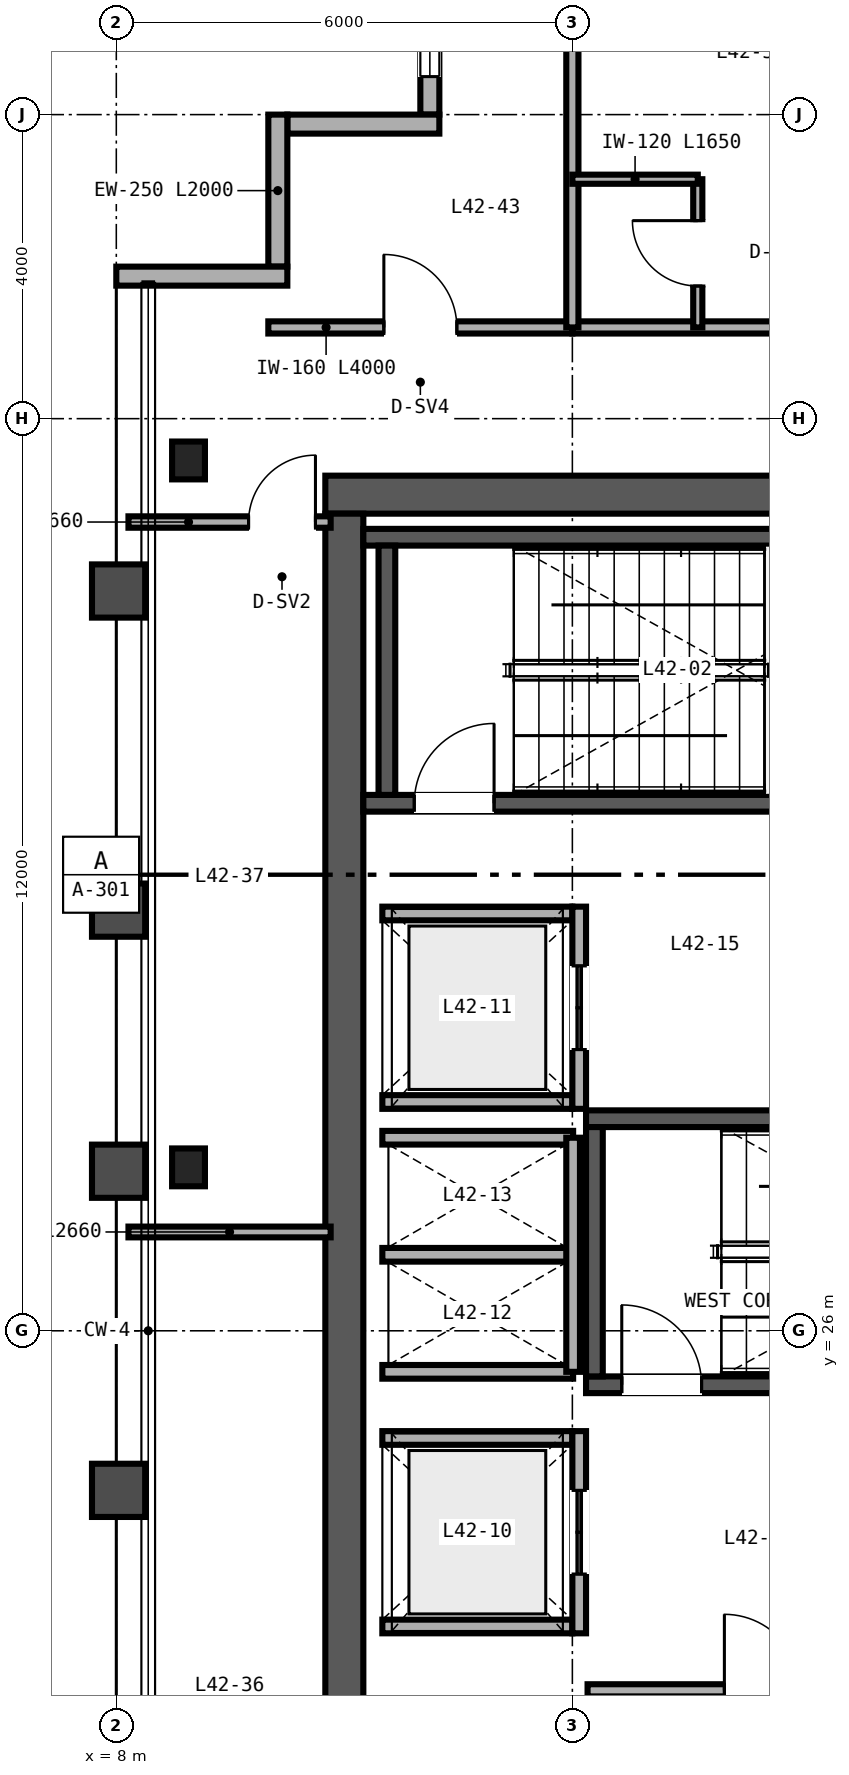
"""IFC4 building model, lengths in metres.
Left out: names, types, materials, properties, quantities, classifications, styles, units other than length and angle.
Written with IfcOpenShell. Run it as: python <this file> out.ifc"""

import sys

from ifc_helpers import new_model, si_unit, direction, frame, frame_2d, origin, origin_2d, place, context, subcontext, project, spatial, rectangle, i_section, extrude, source, transform, mapped, element, fill, save


model = new_model("IFC4")
c1 = context("Model", 3, precision=1e-05, world=origin(), true_north=direction((0.0, 1.0)))
c2 = subcontext(c1, "Body", "Model", "MODEL_VIEW")
j1 = project(units=[si_unit("LENGTHUNIT", "METRE"), si_unit("PLANEANGLEUNIT", "RADIAN")], contexts=[c1])
p1 = place(None, origin())
s1 = spatial("IfcSite", under=j1, at=p1, CompositionType="ELEMENT")
p2 = place(p1, origin())
s2 = spatial("IfcBuilding", under=s1, at=p2, CompositionType="ELEMENT")
p3 = place(p2, frame((0.0, 0.0, 170.4)))
s3 = spatial("IfcBuildingStorey", under=s2, at=p3, CompositionType="ELEMENT", Elevation=170.4)
p4 = place(p3, frame((10.75, 37.0, 0.0), z_axis=(0.0, 0.0, 1.0), x_axis=(1.0, 0.0, 0.0)))
e1 = element("IfcWall", 1, at=p4, inside=s3, PredefinedType="SHEAR", context=c2, shape_type="SweptSolid", body=[
    extrude(rectangle(XDim=12.5, YDim=0.5, at=frame_2d((6.25, 0.0))), origin(), (0.0, 0.0, 1.0), 3.37),
])
p5 = place(p4, frame((8.83, 0.0, 0.0)))
e2 = element("IfcOpeningElement", 2, at=p5, cuts=e1, PredefinedType="OPENING", context=c2, shape_type="SweptSolid", body=[
    extrude(rectangle(XDim=1.0, YDim=2.15, at=frame_2d((0.5, 1.075))), frame((0.0, 0.26, 0.0), z_axis=(0.0, -1.0, 0.0), x_axis=(1.0, 0.0, 0.0)), (0.0, 0.0, 1.0), 0.52),
])
p6 = place(p3, frame((11.0, 15.25, 0.0), z_axis=(0.0, 0.0, 1.0), x_axis=(0.0, 1.0, 0.0)))
e3 = element("IfcWall", 3, at=p6, inside=s3, PredefinedType="SHEAR", context=c2, shape_type="SweptSolid", body=[
    extrude(rectangle(XDim=21.5, YDim=0.5, at=frame_2d((10.75, 0.0))), origin(), (0.0, 0.0, 1.0), 3.37),
])
p7 = place(p3, frame((11.25, 32.94, 0.0), z_axis=(0.0, 0.0, 1.0), x_axis=(1.0, 0.0, 0.0)))
e4 = element("IfcWall", 4, at=p7, inside=s3, PredefinedType="SHEAR", context=c2, shape_type="SweptSolid", body=[
    extrude(rectangle(XDim=8.06, YDim=0.22, at=frame_2d((4.03, 0.0))), origin(), (0.0, 0.0, 1.0), 3.4),
])
p8 = place(p7, frame((0.67, 0.0, 0.0)))
e5 = element("IfcOpeningElement", 5, at=p8, cuts=e4, PredefinedType="OPENING", context=c2, shape_type="SweptSolid", body=[
    extrude(rectangle(XDim=1.05, YDim=2.15, at=frame_2d((0.525, 1.075))), frame((0.0, 0.12, 0.0), z_axis=(0.0, -1.0, 0.0), x_axis=(1.0, 0.0, 0.0)), (0.0, 0.0, 1.0), 0.24),
])
p9 = place(p3, frame((11.25, 36.44, 0.0), z_axis=(0.0, 0.0, 1.0), x_axis=(1.0, 0.0, 0.0)))
e6 = element("IfcWall", 6, at=p9, inside=s3, PredefinedType="SHEAR", context=c2, shape_type="SweptSolid", body=[
    extrude(rectangle(XDim=8.06, YDim=0.22, at=frame_2d((4.03, 0.0))), origin(), (0.0, 0.0, 1.0), 3.4),
])
p10 = place(p3, frame((11.56, 33.05, 0.0), z_axis=(0.0, 0.0, 1.0), x_axis=(0.0, 1.0, 0.0)))
e7 = element("IfcWall", 7, at=p10, inside=s3, PredefinedType="SHEAR", context=c2, shape_type="SweptSolid", body=[
    extrude(rectangle(XDim=3.28, YDim=0.22, at=frame_2d((1.64, 0.0))), origin(), (0.0, 0.0, 1.0), 3.4),
])
p11 = place(p3, frame((14.18, 25.29, 0.0), z_axis=(0.0, 0.0, 1.0), x_axis=(1.0, 0.0, 0.0)))
e8 = element("IfcWall", 8, at=p11, inside=s3, PredefinedType="SHEAR", context=c2, shape_type="SweptSolid", body=[
    extrude(rectangle(XDim=8.57, YDim=0.22, at=frame_2d((4.285, 0.0))), origin(), (0.0, 0.0, 1.0), 3.4),
])
p12 = place(p11, frame((0.47, 0.0, 0.0)))
e9 = element("IfcOpeningElement", 9, at=p12, cuts=e8, PredefinedType="OPENING", context=c2, shape_type="SweptSolid", body=[
    extrude(rectangle(XDim=1.05, YDim=2.15, at=frame_2d((0.525, 1.075))), frame((0.0, 0.12, 0.0), z_axis=(0.0, -1.0, 0.0), x_axis=(1.0, 0.0, 0.0)), (0.0, 0.0, 1.0), 0.24),
])
p13 = place(p3, frame((14.18, 28.79, 0.0), z_axis=(0.0, 0.0, 1.0), x_axis=(1.0, 0.0, 0.0)))
e10 = element("IfcWall", 10, at=p13, inside=s3, PredefinedType="SHEAR", context=c2, shape_type="SweptSolid", body=[
    extrude(rectangle(XDim=8.57, YDim=0.22, at=frame_2d((4.285, 0.0))), origin(), (0.0, 0.0, 1.0), 3.4),
])
p14 = place(p3, frame((14.29, 25.4, 0.0), z_axis=(0.0, 0.0, 1.0), x_axis=(0.0, 1.0, 0.0)))
e11 = element("IfcWall", 11, at=p14, inside=s3, PredefinedType="SHEAR", context=c2, shape_type="SweptSolid", body=[
    extrude(rectangle(XDim=3.28, YDim=0.22, at=frame_2d((1.64, 0.0))), origin(), (0.0, 0.0, 1.0), 3.4),
])
m1 = source(origin(), c2, "Body", "SweptSolid", [
    extrude(i_section(OverallWidth=0.432, OverallDepth=0.498, WebThickness=0.056, FlangeThickness=0.089, FilletRadius=0.025, at=origin_2d()), origin(), (0.0, 0.0, 1.0), 3.37),
])
for number, where, z_axis, x_axis in (
    (12, (8.95, 28.15, 0.0), (0.0, 0.0, 1.0), (1.0, 0.0, 0.0)),
    (13, (8.95, 37.45, 0.0), (0.0, 0.0, 1.0), (1.0, 0.0, 0.0)),
):
    element("IfcColumn", number, at=place(p3, frame(where, z_axis=z_axis, x_axis=x_axis)), inside=s3, PredefinedType="COLUMN", context=c2, shape_type="MappedRepresentation", body=[
        mapped(m1, transform((0.0, 0.0, 0.0), scale=1.0)),
    ])
p15 = place(p3, frame((12.125, 44.0, 0.0), z_axis=(0.0, 0.0, 1.0), x_axis=(0.0, -1.0, 0.0)))
e14 = element("IfcWall", 14, at=p15, inside=s3, PredefinedType="SOLIDWALL", context=c2, shape_type="SweptSolid", body=[
    extrude(rectangle(XDim=2.0, YDim=0.25, at=frame_2d((1.0, 0.0))), origin(), (0.0, 0.0, 1.0), 3.37),
])
p16 = place(p15, frame((0.5, 0.0, 0.85)))
e15 = element("IfcOpeningElement", 15, at=p16, cuts=e14, PredefinedType="OPENING", context=c2, shape_type="SweptSolid", body=[
    extrude(rectangle(XDim=1.0, YDim=1.9, at=frame_2d((0.5, 0.95))), frame((0.0, 0.135, 0.0), z_axis=(0.0, -1.0, 0.0), x_axis=(1.0, 0.0, 0.0)), (0.0, 0.0, 1.0), 0.27),
])
for number, where, z_axis, x_axis in (
    (16, (12.25, 41.875, 0.0), (0.0, 0.0, 1.0), (-1.0, 0.0, 0.0)),
    (17, (10.125, 42.0, 0.0), (0.0, 0.0, 1.0), (0.0, -1.0, 0.0)),
):
    element("IfcWall", number, at=place(p3, frame(where, z_axis=z_axis, x_axis=x_axis)), inside=s3, PredefinedType="SOLIDWALL", context=c2, shape_type="SweptSolid", body=[
        extrude(rectangle(XDim=2.0, YDim=0.25, at=frame_2d((1.0, 0.0))), origin(), (0.0, 0.0, 1.0), 3.37),
    ])
p17 = place(p3, frame((10.25, 39.875, 0.0), z_axis=(0.0, 0.0, 1.0), x_axis=(-1.0, 0.0, 0.0)))
e18 = element("IfcWall", 18, at=p17, inside=s3, PredefinedType="SOLIDWALL", context=c2, shape_type="SweptSolid", body=[
    extrude(rectangle(XDim=2.25, YDim=0.25, at=frame_2d((1.125, 0.0))), origin(), (0.0, 0.0, 1.0), 3.37),
])
for number, where, z_axis, x_axis in (
    (19, (11.5, 22.11, 0.0), (0.0, 0.0, 1.0), (1.0, 0.0, 0.0)),
    (20, (11.5, 24.59, 0.0), (0.0, 0.0, 1.0), (1.0, 0.0, 0.0)),
):
    element("IfcWall", number, at=place(p3, frame(where, z_axis=z_axis, x_axis=x_axis)), inside=s3, PredefinedType="SOLIDWALL", context=c2, shape_type="SweptSolid", body=[
        extrude(rectangle(XDim=2.5, YDim=0.18, at=frame_2d((1.25, 0.0))), origin(), (0.0, 0.0, 1.0), 3.37),
    ])
p18 = place(p3, frame((14.09, 22.02, 0.0), z_axis=(0.0, 0.0, 1.0), x_axis=(0.0, 1.0, 0.0)))
e21 = element("IfcWall", 21, at=p18, inside=s3, PredefinedType="SOLIDWALL", context=c2, shape_type="SweptSolid", body=[
    extrude(rectangle(XDim=2.66, YDim=0.18, at=frame_2d((1.33, 0.0))), origin(), (0.0, 0.0, 1.0), 3.37),
])
p19 = place(p18, frame((0.78, 0.0, 0.0)))
e22 = element("IfcOpeningElement", 22, at=p19, cuts=e21, PredefinedType="OPENING", context=c2, shape_type="SweptSolid", body=[
    extrude(rectangle(XDim=1.1, YDim=2.2, at=frame_2d((0.55, 1.1))), frame((0.0, 0.1, 0.0), z_axis=(0.0, -1.0, 0.0), x_axis=(1.0, 0.0, 0.0)), (0.0, 0.0, 1.0), 0.2),
])
for number, where, z_axis, x_axis in (
    (23, (11.5, 29.01, 0.0), (0.0, 0.0, 1.0), (1.0, 0.0, 0.0)),
    (24, (11.5, 31.49, 0.0), (0.0, 0.0, 1.0), (1.0, 0.0, 0.0)),
):
    element("IfcWall", number, at=place(p3, frame(where, z_axis=z_axis, x_axis=x_axis)), inside=s3, PredefinedType="SOLIDWALL", context=c2, shape_type="SweptSolid", body=[
        extrude(rectangle(XDim=2.5, YDim=0.18, at=frame_2d((1.25, 0.0))), origin(), (0.0, 0.0, 1.0), 3.37),
    ])
p20 = place(p3, frame((14.09, 28.92, 0.0), z_axis=(0.0, 0.0, 1.0), x_axis=(0.0, 1.0, 0.0)))
e25 = element("IfcWall", 25, at=p20, inside=s3, PredefinedType="SOLIDWALL", context=c2, shape_type="SweptSolid", body=[
    extrude(rectangle(XDim=2.66, YDim=0.18, at=frame_2d((1.33, 0.0))), origin(), (0.0, 0.0, 1.0), 3.37),
])
p21 = place(p20, frame((0.78, 0.0, 0.0)))
e26 = element("IfcOpeningElement", 26, at=p21, cuts=e25, PredefinedType="OPENING", context=c2, shape_type="SweptSolid", body=[
    extrude(rectangle(XDim=1.1, YDim=2.2, at=frame_2d((0.55, 1.1))), frame((0.0, 0.1, 0.0), z_axis=(0.0, -1.0, 0.0), x_axis=(1.0, 0.0, 0.0)), (0.0, 0.0, 1.0), 0.2),
])
for number, where, z_axis, x_axis in (
    (27, (11.5, 25.46, 0.0), (0.0, 0.0, 1.0), (1.0, 0.0, 0.0)),
    (28, (11.5, 27.0, 0.0), (0.0, 0.0, 1.0), (1.0, 0.0, 0.0)),
    (29, (11.5, 28.54, 0.0), (0.0, 0.0, 1.0), (1.0, 0.0, 0.0)),
):
    element("IfcWall", number, at=place(p3, frame(where, z_axis=z_axis, x_axis=x_axis)), inside=s3, PredefinedType="SOLIDWALL", context=c2, shape_type="SweptSolid", body=[
        extrude(rectangle(XDim=2.51, YDim=0.18, at=frame_2d((1.255, 0.0))), origin(), (0.0, 0.0, 1.0), 3.37),
    ])
p22 = place(p3, frame((14.01, 25.46, 0.0), z_axis=(0.0, 0.0, 1.0), x_axis=(0.0, 1.0, 0.0)))
e30 = element("IfcWall", 30, at=p22, inside=s3, PredefinedType="SOLIDWALL", context=c2, shape_type="SweptSolid", body=[
    extrude(rectangle(XDim=3.08, YDim=0.18, at=frame_2d((1.54, 0.0))), origin(), (0.0, 0.0, 1.0), 3.37),
])
p23 = place(p3, frame((14.2, 21.27, 0.0), z_axis=(0.0, 0.0, 1.0), x_axis=(1.0, 0.0, 0.0)))
e31 = element("IfcWall", 31, at=p23, inside=s3, PredefinedType="PARTITIONING", context=c2, shape_type="SweptSolid", body=[
    extrude(rectangle(XDim=4.58, YDim=0.16, at=frame_2d((2.29, 0.0))), origin(), (0.0, 0.0, 1.0), 3.37),
])
p24 = place(p23, frame((1.8, 0.0, 0.0)))
e32 = element("IfcOpeningElement", 32, at=p24, cuts=e31, PredefinedType="OPENING", context=c2, shape_type="SweptSolid", body=[
    extrude(rectangle(XDim=1.0, YDim=2.15, at=frame_2d((0.5, 1.075))), frame((0.0, 0.09, 0.0), z_axis=(0.0, -1.0, 0.0), x_axis=(1.0, 0.0, 0.0)), (0.0, 0.0, 1.0), 0.18),
])
p25 = place(p3, frame((8.16, 36.64, 0.0), z_axis=(0.0, 0.0, 1.0), x_axis=(1.0, 0.0, 0.0)))
e33 = element("IfcWall", 33, at=p25, inside=s3, PredefinedType="PARTITIONING", context=c2, shape_type="SweptSolid", body=[
    extrude(rectangle(XDim=2.66, YDim=0.15, at=frame_2d((1.33, 0.0))), origin(), (0.0, 0.0, 1.0), 2.753),
])
p26 = place(p25, frame((1.58, 0.0, 0.0)))
e34 = element("IfcOpeningElement", 34, at=p26, cuts=e33, PredefinedType="OPENING", context=c2, shape_type="SweptSolid", body=[
    extrude(rectangle(XDim=0.88, YDim=2.15, at=frame_2d((0.44, 1.075))), frame((0.0, 0.085, 0.0), z_axis=(0.0, -1.0, 0.0), x_axis=(1.0, 0.0, 0.0)), (0.0, 0.0, 1.0), 0.17),
])
p27 = place(p3, frame((8.16, 27.3, 0.0), z_axis=(0.0, 0.0, 1.0), x_axis=(1.0, 0.0, 0.0)))
e35 = element("IfcWall", 35, at=p27, inside=s3, PredefinedType="PARTITIONING", context=c2, shape_type="SweptSolid", body=[
    extrude(rectangle(XDim=2.66, YDim=0.142, at=frame_2d((1.33, 0.0))), origin(), (0.0, 0.0, 1.0), 2.591),
])
p28 = place(p3, frame((10.0, 39.2, 0.0), z_axis=(0.0, 0.0, 1.0), x_axis=(1.0, 0.0, 0.0)))
e36 = element("IfcWall", 36, at=p28, inside=s3, PredefinedType="PARTITIONING", context=c2, shape_type="SweptSolid", body=[
    extrude(rectangle(XDim=4.0, YDim=0.16, at=frame_2d((2.0, 0.0))), origin(), (0.0, 0.0, 1.0), 3.37),
])
p29 = place(p28, frame((1.52, 0.0, 0.0)))
e37 = element("IfcOpeningElement", 37, at=p29, cuts=e36, PredefinedType="OPENING", context=c2, shape_type="SweptSolid", body=[
    extrude(rectangle(XDim=0.96, YDim=2.15, at=frame_2d((0.48, 1.075))), frame((0.0, 0.09, 0.0), z_axis=(0.0, -1.0, 0.0), x_axis=(1.0, 0.0, 0.0)), (0.0, 0.0, 1.0), 0.18),
])
p30 = place(p3, frame((14.0, 39.2, 0.0), z_axis=(0.0, 0.0, 1.0), x_axis=(1.0, 0.0, 0.0)))
e38 = element("IfcWall", 38, at=p30, inside=s3, PredefinedType="PARTITIONING", context=c2, shape_type="SweptSolid", body=[
    extrude(rectangle(XDim=36.0, YDim=0.16, at=frame_2d((18.0, 0.0))), origin(), (0.0, 0.0, 1.0), 2.913),
])
p31 = place(p30, frame((3.14, 0.0, 0.0)))
e39 = element("IfcOpeningElement", 39, at=p31, cuts=e38, PredefinedType="OPENING", context=c2, shape_type="SweptSolid", body=[
    extrude(rectangle(XDim=0.94, YDim=2.15, at=frame_2d((0.47, 1.075))), frame((0.0, 0.09, 0.0), z_axis=(0.0, -1.0, 0.0), x_axis=(1.0, 0.0, 0.0)), (0.0, 0.0, 1.0), 0.18),
])
p32 = place(p30, frame((7.54, 0.0, 0.0)))
e40 = element("IfcOpeningElement", 40, at=p32, cuts=e38, PredefinedType="OPENING", context=c2, shape_type="SweptSolid", body=[
    extrude(rectangle(XDim=0.94, YDim=2.15, at=frame_2d((0.47, 1.075))), frame((0.0, 0.09, 0.0), z_axis=(0.0, -1.0, 0.0), x_axis=(1.0, 0.0, 0.0)), (0.0, 0.0, 1.0), 0.18),
])
p33 = place(p30, frame((11.94, 0.0, 0.0)))
e41 = element("IfcOpeningElement", 41, at=p33, cuts=e38, PredefinedType="OPENING", context=c2, shape_type="SweptSolid", body=[
    extrude(rectangle(XDim=0.94, YDim=2.15, at=frame_2d((0.47, 1.075))), frame((0.0, 0.09, 0.0), z_axis=(0.0, -1.0, 0.0), x_axis=(1.0, 0.0, 0.0)), (0.0, 0.0, 1.0), 0.18),
])
p34 = place(p30, frame((16.34, 0.0, 0.0)))
e42 = element("IfcOpeningElement", 42, at=p34, cuts=e38, PredefinedType="OPENING", context=c2, shape_type="SweptSolid", body=[
    extrude(rectangle(XDim=0.94, YDim=2.15, at=frame_2d((0.47, 1.075))), frame((0.0, 0.09, 0.0), z_axis=(0.0, -1.0, 0.0), x_axis=(1.0, 0.0, 0.0)), (0.0, 0.0, 1.0), 0.18),
])
p35 = place(p30, frame((20.94, 0.0, 0.0)))
e43 = element("IfcOpeningElement", 43, at=p35, cuts=e38, PredefinedType="OPENING", context=c2, shape_type="SweptSolid", body=[
    extrude(rectangle(XDim=0.94, YDim=2.15, at=frame_2d((0.47, 1.075))), frame((0.0, 0.09, 0.0), z_axis=(0.0, -1.0, 0.0), x_axis=(1.0, 0.0, 0.0)), (0.0, 0.0, 1.0), 0.18),
])
p36 = place(p30, frame((25.74, 0.0, 0.0)))
e44 = element("IfcOpeningElement", 44, at=p36, cuts=e38, PredefinedType="OPENING", context=c2, shape_type="SweptSolid", body=[
    extrude(rectangle(XDim=0.94, YDim=2.15, at=frame_2d((0.47, 1.075))), frame((0.0, 0.09, 0.0), z_axis=(0.0, -1.0, 0.0), x_axis=(1.0, 0.0, 0.0)), (0.0, 0.0, 1.0), 0.18),
])
p37 = place(p30, frame((30.24, 0.0, 0.0)))
e45 = element("IfcOpeningElement", 45, at=p37, cuts=e38, PredefinedType="OPENING", context=c2, shape_type="SweptSolid", body=[
    extrude(rectangle(XDim=0.94, YDim=2.15, at=frame_2d((0.47, 1.075))), frame((0.0, 0.09, 0.0), z_axis=(0.0, -1.0, 0.0), x_axis=(1.0, 0.0, 0.0)), (0.0, 0.0, 1.0), 0.18),
])
p38 = place(p30, frame((34.74, 0.0, 0.0)))
e46 = element("IfcOpeningElement", 46, at=p38, cuts=e38, PredefinedType="OPENING", context=c2, shape_type="SweptSolid", body=[
    extrude(rectangle(XDim=0.94, YDim=2.15, at=frame_2d((0.47, 1.075))), frame((0.0, 0.09, 0.0), z_axis=(0.0, -1.0, 0.0), x_axis=(1.0, 0.0, 0.0)), (0.0, 0.0, 1.0), 0.18),
])
p39 = place(p3, frame((14.0, 39.2, 0.0), z_axis=(0.0, 0.0, 1.0), x_axis=(0.0, 1.0, 0.0)))
e47 = element("IfcWall", 47, at=p39, inside=s3, PredefinedType="PARTITIONING", context=c2, shape_type="SweptSolid", body=[
    extrude(rectangle(XDim=6.44, YDim=0.16, at=frame_2d((3.22, 0.0))), origin(), (0.0, 0.0, 1.0), 2.677),
])
p40 = place(p3, frame((15.65, 39.2, 0.0), z_axis=(0.0, 0.0, 1.0), x_axis=(0.0, 1.0, 0.0)))
e48 = element("IfcWall", 48, at=p40, inside=s3, PredefinedType="PARTITIONING", context=c2, shape_type="SweptSolid", body=[
    extrude(rectangle(XDim=1.95, YDim=0.12, at=frame_2d((0.975, 0.0))), origin(), (0.0, 0.0, 1.0), 3.37),
])
p41 = place(p40, frame((0.545, 0.0, 0.0)))
e49 = element("IfcOpeningElement", 49, at=p41, cuts=e48, PredefinedType="OPENING", context=c2, shape_type="SweptSolid", body=[
    extrude(rectangle(XDim=0.86, YDim=2.1, at=frame_2d((0.43, 1.05))), frame((0.0, 0.07, 0.0), z_axis=(0.0, -1.0, 0.0), x_axis=(1.0, 0.0, 0.0)), (0.0, 0.0, 1.0), 0.14),
])
p42 = place(p3, frame((14.0, 41.15, 0.0), z_axis=(0.0, 0.0, 1.0), x_axis=(1.0, 0.0, 0.0)))
e50 = element("IfcWall", 50, at=p42, inside=s3, PredefinedType="PARTITIONING", context=c2, shape_type="SweptSolid", body=[
    extrude(rectangle(XDim=1.65, YDim=0.12, at=frame_2d((0.825, 0.0))), origin(), (0.0, 0.0, 1.0), 3.37),
])
m2 = source(origin(), c2, "Body", "SweptSolid", [
    extrude(rectangle(XDim=1.0, YDim=1.9, at=frame_2d((0.5, 0.95))), frame((0.0, 0.03, 0.0), z_axis=(0.0, -1.0, 0.0), x_axis=(1.0, 0.0, 0.0)), (0.0, 0.0, 1.0), 0.06),
])
p43 = place(p16, origin())
e51 = element("IfcWindow", 51, at=p43, inside=s3, PartitioningType="SINGLE_PANEL", PredefinedType="WINDOW", context=c2, shape_type="MappedRepresentation", body=[
    mapped(m2, transform((0.0, 0.0, 0.0), scale=1.0)),
])
fill(e15, e51)
m3 = source(origin(), c2, "Body", "SweptSolid", [
    extrude(rectangle(XDim=1.05, YDim=2.15, at=frame_2d((0.525, 1.075))), frame((0.0, 0.025, 0.0), z_axis=(0.0, -1.0, 0.0), x_axis=(1.0, 0.0, 0.0)), (0.0, 0.0, 1.0), 0.05),
])
p44 = place(p8, origin())
e52 = element("IfcDoor", 52, at=p44, inside=s3, OperationType="SINGLE_SWING_RIGHT", PredefinedType="DOOR", context=c2, shape_type="MappedRepresentation", body=[
    mapped(m3, transform((0.0, 0.0, 0.0), scale=1.0)),
])
fill(e5, e52)
p45 = place(p12, origin())
e53 = element("IfcDoor", 53, at=p45, inside=s3, OperationType="SINGLE_SWING_LEFT", PredefinedType="DOOR", context=c2, shape_type="MappedRepresentation", body=[
    mapped(m3, transform((0.0, 0.0, 0.0), scale=1.0)),
])
fill(e9, e53)
m4 = source(origin(), c2, "Body", "SweptSolid", [
    extrude(rectangle(XDim=1.1, YDim=2.2, at=frame_2d((0.55, 1.1))), frame((0.0, 0.025, 0.0), z_axis=(0.0, -1.0, 0.0), x_axis=(1.0, 0.0, 0.0)), (0.0, 0.0, 1.0), 0.05),
])
p46 = place(p19, origin())
e54 = element("IfcDoor", 54, at=p46, inside=s3, OperationType="DOUBLE_DOOR_SLIDING", PredefinedType="DOOR", context=c2, shape_type="MappedRepresentation", body=[
    mapped(m4, transform((0.0, 0.0, 0.0), scale=1.0)),
])
fill(e22, e54)
p47 = place(p21, origin())
e55 = element("IfcDoor", 55, at=p47, inside=s3, OperationType="DOUBLE_DOOR_SLIDING", PredefinedType="DOOR", context=c2, shape_type="MappedRepresentation", body=[
    mapped(m4, transform((0.0, 0.0, 0.0), scale=1.0)),
])
fill(e26, e55)
m5 = source(origin(), c2, "Body", "SweptSolid", [
    extrude(rectangle(XDim=1.0, YDim=2.15, at=frame_2d((0.5, 1.075))), frame((0.0, 0.025, 0.0), z_axis=(0.0, -1.0, 0.0), x_axis=(1.0, 0.0, 0.0)), (0.0, 0.0, 1.0), 0.05),
])
p48 = place(p24, origin())
e56 = element("IfcDoor", 56, at=p48, inside=s3, OperationType="SINGLE_SWING_LEFT", PredefinedType="DOOR", context=c2, shape_type="MappedRepresentation", body=[
    mapped(m5, transform((0.0, 0.0, 0.0), scale=1.0)),
])
fill(e32, e56)
m6 = source(origin(), c2, "Body", "SweptSolid", [
    extrude(rectangle(XDim=0.88, YDim=2.15, at=frame_2d((0.44, 1.075))), frame((0.0, 0.025, 0.0), z_axis=(0.0, -1.0, 0.0), x_axis=(1.0, 0.0, 0.0)), (0.0, 0.0, 1.0), 0.05),
])
p49 = place(p26, origin())
e57 = element("IfcDoor", 57, at=p49, inside=s3, OperationType="SINGLE_SWING_RIGHT", PredefinedType="DOOR", context=c2, shape_type="MappedRepresentation", body=[
    mapped(m6, transform((0.0, 0.0, 0.0), scale=1.0)),
])
fill(e34, e57)
m7 = source(origin(), c2, "Body", "SweptSolid", [
    extrude(rectangle(XDim=0.96, YDim=2.15, at=frame_2d((0.48, 1.075))), frame((0.0, 0.025, 0.0), z_axis=(0.0, -1.0, 0.0), x_axis=(1.0, 0.0, 0.0)), (0.0, 0.0, 1.0), 0.05),
])
p50 = place(p29, origin())
e58 = element("IfcDoor", 58, at=p50, inside=s3, OperationType="SINGLE_SWING_LEFT", PredefinedType="DOOR", context=c2, shape_type="MappedRepresentation", body=[
    mapped(m7, transform((0.0, 0.0, 0.0), scale=1.0)),
])
fill(e37, e58)
m8 = source(origin(), c2, "Body", "SweptSolid", [
    extrude(rectangle(XDim=0.86, YDim=2.1, at=frame_2d((0.43, 1.05))), frame((0.0, 0.025, 0.0), z_axis=(0.0, -1.0, 0.0), x_axis=(1.0, 0.0, 0.0)), (0.0, 0.0, 1.0), 0.05),
])
p51 = place(p41, origin())
e59 = element("IfcDoor", 59, at=p51, inside=s3, OperationType="SINGLE_SWING_RIGHT", PredefinedType="DOOR", context=c2, shape_type="MappedRepresentation", body=[
    mapped(m8, transform((0.0, 0.0, 0.0), scale=1.0)),
])
fill(e49, e59)
save(model, sys.argv[1])
